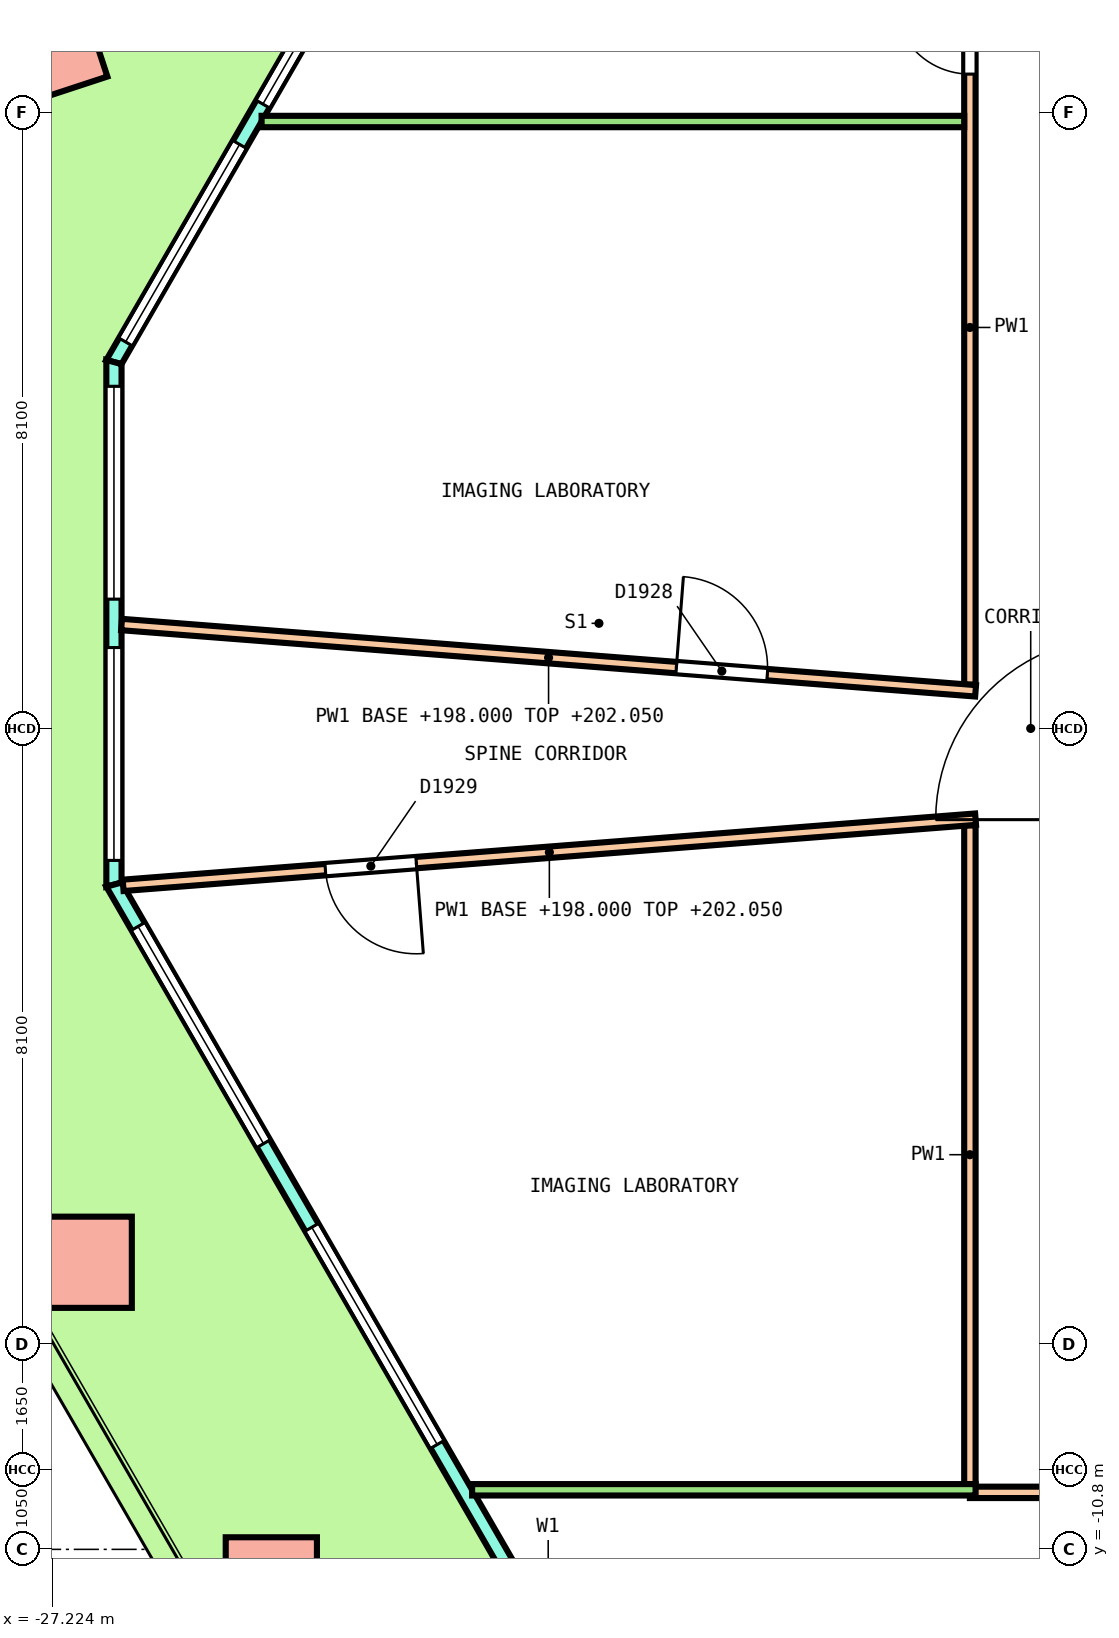
"""IFC4 building model, lengths in metres.
Left out: names, types, materials, properties, quantities, classifications, styles, units other than length and angle.
Written with IfcOpenShell. Run it as: python <this file> out.ifc"""

import sys

from ifc_helpers import new_model, si_unit, direction, frame, frame_2d, origin, origin_2d, place, context, subcontext, project, spatial, polyline, rectangle, outline, extrude, element, fill, save


model = new_model("IFC4")
c1 = context("Model", 3, precision=1e-05, world=origin(), true_north=direction((0.0, 1.0)))
c2 = subcontext(c1, "Body", "Model", "MODEL_VIEW")
j1 = project(units=[si_unit("LENGTHUNIT", "METRE"), si_unit("PLANEANGLEUNIT", "RADIAN")], contexts=[c1])
p1 = place(None, origin())
s1 = spatial("IfcSite", under=j1, at=p1, CompositionType="ELEMENT")
p2 = place(p1, origin())
s2 = spatial("IfcBuilding", under=s1, at=p2, CompositionType="ELEMENT")
p3 = place(p2, frame((0.0, 0.0, 198.0)))
s3 = spatial("IfcBuildingStorey", under=s2, at=p3, CompositionType="ELEMENT", Elevation=198.0)
p4 = place(p3, frame((-27.255, 8.959, 0.0), z_axis=(0.206606302498, -0.238581087409, 0.9488903522), x_axis=(-0.524170547966, -0.845891471379, -0.09855381927)))
e1 = element("IfcColumn", 1, at=p4, inside=s3, PredefinedType="COLUMN", context=c2, shape_type="SweptSolid", body=[
    extrude(rectangle(XDim=1.2, YDim=1.2, at=origin_2d()), origin(), (0.0, 0.0, 1.0), 4.268),
])
p5 = place(p3, frame((-26.776, -7.023, 0.0), z_axis=(0.106402456539, -0.184226228858, 0.977107575369), x_axis=(0.488665296242, -0.846135593228, -0.212745825157)))
e2 = element("IfcColumn", 2, at=p5, inside=s3, PredefinedType="COLUMN", context=c2, shape_type="SweptSolid", body=[
    extrude(rectangle(XDim=1.2, YDim=1.2, at=origin_2d()), origin(), (0.0, 0.0, 1.0), 4.135),
])
p6 = place(p3, frame((-24.341, -11.241, 0.0), z_axis=(0.036163093475, -0.062682695358, 0.997378118054), x_axis=(0.498499920841, -0.86386395882, -0.07236635664)))
e3 = element("IfcColumn", 3, at=p6, inside=s3, PredefinedType="COLUMN", context=c2, shape_type="SweptSolid", body=[
    extrude(rectangle(XDim=1.2, YDim=1.2, at=origin_2d()), origin(), (0.0, 0.0, 1.0), 4.051),
])
p7 = place(p3, frame((-17.38, 20.463, 0.0), z_axis=(0.0, 0.0, 1.0), x_axis=(-0.500000137386, -0.866025324465, 0.0)))
e4 = element("IfcWall", 4, at=p7, inside=s3, PredefinedType="SOLIDWALL", context=c2, shape_type="SweptSolid", body=[
    extrude(outline(polyline([(-0.027, -0.1), (0.979, -0.1), (1.986, -0.1), (2.992, -0.1), (3.999, -0.1), (5.005, -0.1), (6.012, -0.1), (7.018, -0.1), (8.025, -0.1), (9.031, -0.1), (10.038, -0.1), (11.044, -0.1), (12.051, -0.1), (13.057, -0.1), (14.063, -0.1), (15.07, -0.1), (16.076, -0.1), (17.083, -0.1), (18.089, -0.1), (18.036, 0.1), (17.035, 0.1), (16.035, 0.1), (15.034, 0.1), (14.034, 0.1), (13.033, 0.1), (12.033, 0.1), (11.032, 0.1), (10.032, 0.1), (9.031, 0.1), (8.031, 0.1), (7.03, 0.1), (6.03, 0.1), (5.029, 0.1), (4.029, 0.1), (3.028, 0.1), (2.028, 0.1), (1.027, 0.1), (0.027, 0.1), (-0.027, -0.1)])), origin(), (0.0, 0.0, 1.0), 4.1),
])
p8 = place(p7, frame((0.306, 0.0, 0.1)))
e5 = element("IfcOpeningElement", 5, at=p8, cuts=e4, PredefinedType="OPENING", context=c2, shape_type="SweptSolid", body=[
    extrude(rectangle(XDim=3.0, YDim=2.9, at=frame_2d((1.5, 1.45))), frame((0.0, 0.11, 0.0), z_axis=(0.0, -1.0, 0.0), x_axis=(1.0, 0.0, 0.0)), (0.0, 0.0, 1.0), 0.22),
])
p9 = place(p7, frame((3.919, 0.0, 0.1)))
e6 = element("IfcOpeningElement", 6, at=p9, cuts=e4, PredefinedType="OPENING", context=c2, shape_type="SweptSolid", body=[
    extrude(rectangle(XDim=3.0, YDim=2.9, at=frame_2d((1.5, 1.45))), frame((0.0, 0.11, 0.0), z_axis=(0.0, -1.0, 0.0), x_axis=(1.0, 0.0, 0.0)), (0.0, 0.0, 1.0), 0.22),
])
p10 = place(p7, frame((8.131, 0.0, 0.0)))
e7 = element("IfcOpeningElement", 7, at=p10, cuts=e4, PredefinedType="OPENING", context=c2, shape_type="SweptSolid", body=[
    extrude(rectangle(XDim=1.8, YDim=2.4, at=frame_2d((0.9, 1.2))), frame((0.0, 0.11, 0.0), z_axis=(0.0, -1.0, 0.0), x_axis=(1.0, 0.0, 0.0)), (0.0, 0.0, 1.0), 0.22),
])
p11 = place(p7, frame((8.131, 0.0, 2.55)))
e8 = element("IfcOpeningElement", 8, at=p11, cuts=e4, PredefinedType="OPENING", context=c2, shape_type="SweptSolid", body=[
    extrude(rectangle(XDim=1.8, YDim=0.45, at=frame_2d((0.9, 0.225))), frame((0.0, 0.11, 0.0), z_axis=(0.0, -1.0, 0.0), x_axis=(1.0, 0.0, 0.0)), (0.0, 0.0, 1.0), 0.22),
])
p12 = place(p7, frame((11.144, 0.0, 0.1)))
e9 = element("IfcOpeningElement", 9, at=p12, cuts=e4, PredefinedType="OPENING", context=c2, shape_type="SweptSolid", body=[
    extrude(rectangle(XDim=3.0, YDim=2.9, at=frame_2d((1.5, 1.45))), frame((0.0, 0.11, 0.0), z_axis=(0.0, -1.0, 0.0), x_axis=(1.0, 0.0, 0.0)), (0.0, 0.0, 1.0), 0.22),
])
p13 = place(p7, frame((14.756, 0.0, 0.1)))
e10 = element("IfcOpeningElement", 10, at=p13, cuts=e4, PredefinedType="OPENING", context=c2, shape_type="SweptSolid", body=[
    extrude(rectangle(XDim=3.0, YDim=2.9, at=frame_2d((1.5, 1.45))), frame((0.0, 0.11, 0.0), z_axis=(0.0, -1.0, 0.0), x_axis=(1.0, 0.0, 0.0)), (0.0, 0.0, 1.0), 0.22),
])
p14 = place(p3, frame((-26.411, 4.82, 0.0), z_axis=(0.0, 0.0, 1.0), x_axis=(0.0, -1.0, 0.0)))
e11 = element("IfcWall", 11, at=p14, inside=s3, PredefinedType="SOLIDWALL", context=c2, shape_type="SweptSolid", body=[
    extrude(outline(polyline([(-0.027, -0.1), (1.128, -0.1), (2.283, -0.1), (3.438, -0.1), (4.592, -0.1), (5.747, -0.1), (6.902, -0.1), (6.848, 0.1), (5.711, 0.1), (4.574, 0.1), (3.438, 0.1), (2.301, 0.1), (1.164, 0.1), (0.027, 0.1), (-0.027, -0.1)])), origin(), (0.0, 0.0, 1.0), 4.1),
])
p15 = place(p14, frame((0.319, 0.0, 0.1)))
e12 = element("IfcOpeningElement", 12, at=p15, cuts=e11, PredefinedType="OPENING", context=c2, shape_type="SweptSolid", body=[
    extrude(rectangle(XDim=2.8, YDim=2.9, at=frame_2d((1.4, 1.45))), frame((0.0, 0.11, 0.0), z_axis=(0.0, -1.0, 0.0), x_axis=(1.0, 0.0, 0.0)), (0.0, 0.0, 1.0), 0.22),
])
p16 = place(p14, frame((3.756, 0.0, 0.1)))
e13 = element("IfcOpeningElement", 13, at=p16, cuts=e11, PredefinedType="OPENING", context=c2, shape_type="SweptSolid", body=[
    extrude(rectangle(XDim=2.8, YDim=2.9, at=frame_2d((1.4, 1.45))), frame((0.0, 0.11, 0.0), z_axis=(0.0, -1.0, 0.0), x_axis=(1.0, 0.0, 0.0)), (0.0, 0.0, 1.0), 0.22),
])
p17 = place(p3, frame((-26.411, -2.055, 0.0), z_axis=(0.0, 0.0, 1.0), x_axis=(0.50000204422, -0.86602422355, 0.0)))
e14 = element("IfcWall", 14, at=p17, inside=s3, PredefinedType="SOLIDWALL", context=c2, shape_type="SweptSolid", body=[
    extrude(outline(polyline([(-0.027, -0.1), (1.014, -0.1), (2.055, -0.1), (3.097, -0.1), (4.138, -0.1), (5.179, -0.1), (6.22, -0.1), (7.261, -0.1), (8.303, -0.1), (9.344, -0.1), (10.385, -0.1), (11.426, -0.1), (12.468, -0.1), (13.509, -0.1), (14.55, -0.1), (15.591, -0.1), (16.632, -0.1), (17.673, -0.1), (18.715, -0.1), (19.756, -0.1), (20.797, -0.1), (21.838, -0.1), (22.879, -0.1), (22.826, 0.1), (21.789, 0.1), (20.753, 0.1), (19.717, 0.1), (18.68, 0.1), (17.644, 0.1), (16.608, 0.1), (15.572, 0.1), (14.535, 0.1), (13.499, 0.1), (12.463, 0.1), (11.426, 0.1), (10.39, 0.1), (9.354, 0.1), (8.317, 0.1), (7.281, 0.1), (6.245, 0.1), (5.208, 0.1), (4.172, 0.1), (3.136, 0.1), (2.099, 0.1), (1.063, 0.1), (0.027, 0.1), (-0.027, -0.1)])), origin(), (0.0, 0.0, 1.0), 4.1),
])
p18 = place(p17, frame((0.635, 0.0, 0.1)))
e15 = element("IfcOpeningElement", 15, at=p18, cuts=e14, PredefinedType="OPENING", context=c2, shape_type="SweptSolid", body=[
    extrude(rectangle(XDim=3.3, YDim=2.9, at=frame_2d((1.65, 1.45))), frame((0.0, 0.11, 0.0), z_axis=(0.0, -1.0, 0.0), x_axis=(1.0, 0.0, 0.0)), (0.0, 0.0, 1.0), 0.22),
])
p19 = place(p17, frame((5.206, 0.0, 0.1)))
e16 = element("IfcOpeningElement", 16, at=p19, cuts=e14, PredefinedType="OPENING", context=c2, shape_type="SweptSolid", body=[
    extrude(rectangle(XDim=3.3, YDim=2.9, at=frame_2d((1.65, 1.45))), frame((0.0, 0.11, 0.0), z_axis=(0.0, -1.0, 0.0), x_axis=(1.0, 0.0, 0.0)), (0.0, 0.0, 1.0), 0.22),
])
p20 = place(p17, frame((10.526, 0.0, 0.0)))
e17 = element("IfcOpeningElement", 17, at=p20, cuts=e14, PredefinedType="OPENING", context=c2, shape_type="SweptSolid", body=[
    extrude(rectangle(XDim=1.8, YDim=2.4, at=frame_2d((0.9, 1.2))), frame((0.0, 0.11, 0.0), z_axis=(0.0, -1.0, 0.0), x_axis=(1.0, 0.0, 0.0)), (0.0, 0.0, 1.0), 0.22),
])
p21 = place(p17, frame((10.526, 0.0, 2.55)))
e18 = element("IfcOpeningElement", 18, at=p21, cuts=e14, PredefinedType="OPENING", context=c2, shape_type="SweptSolid", body=[
    extrude(rectangle(XDim=1.8, YDim=0.45, at=frame_2d((0.9, 0.225))), frame((0.0, 0.11, 0.0), z_axis=(0.0, -1.0, 0.0), x_axis=(1.0, 0.0, 0.0)), (0.0, 0.0, 1.0), 0.22),
])
p22 = place(p17, frame((14.347, 0.0, 0.1)))
e19 = element("IfcOpeningElement", 19, at=p22, cuts=e14, PredefinedType="OPENING", context=c2, shape_type="SweptSolid", body=[
    extrude(rectangle(XDim=3.3, YDim=2.9, at=frame_2d((1.65, 1.45))), frame((0.0, 0.11, 0.0), z_axis=(0.0, -1.0, 0.0), x_axis=(1.0, 0.0, 0.0)), (0.0, 0.0, 1.0), 0.22),
])
p23 = place(p17, frame((18.917, 0.0, 0.1)))
e20 = element("IfcOpeningElement", 20, at=p23, cuts=e14, PredefinedType="OPENING", context=c2, shape_type="SweptSolid", body=[
    extrude(rectangle(XDim=3.3, YDim=2.9, at=frame_2d((1.65, 1.45))), frame((0.0, 0.11, 0.0), z_axis=(0.0, -1.0, 0.0), x_axis=(1.0, 0.0, 0.0)), (0.0, 0.0, 1.0), 0.22),
])
p24 = place(p3, frame((-15.15, -9.941, 0.0), z_axis=(0.0, 0.0, 1.0), x_axis=(0.0, 1.0, 0.0)))
e21 = element("IfcWall", 21, at=p24, inside=s3, PredefinedType="PARTITIONING", context=c2, shape_type="SweptSolid", body=[
    extrude(rectangle(XDim=8.667, YDim=0.15, at=frame_2d((4.333, 0.0))), origin(), (0.0, 0.0, 1.0), 3.05),
])
p25 = place(p3, frame((-15.15, 0.576, 0.0), z_axis=(0.0, 0.0, 1.0), x_axis=(0.0, 1.0, 0.0)))
e22 = element("IfcWall", 22, at=p25, inside=s3, PredefinedType="PARTITIONING", context=c2, shape_type="SweptSolid", body=[
    extrude(rectangle(XDim=9.399, YDim=0.15, at=frame_2d((4.7, 0.0))), origin(), (0.0, 0.0, 1.0), 3.05),
])
p26 = place(p25, frame((8.033, 0.0, 0.0)))
e23 = element("IfcOpeningElement", 23, at=p26, cuts=e22, PredefinedType="OPENING", context=c2, shape_type="SweptSolid", body=[
    extrude(rectangle(XDim=1.0, YDim=2.1, at=frame_2d((0.5, 1.05))), frame((0.0, 0.085, 0.0), z_axis=(0.0, -1.0, 0.0), x_axis=(1.0, 0.0, 0.0)), (0.0, 0.0, 1.0), 0.17),
])
p27 = place(p3, frame((-15.15, -10.05, 0.0), z_axis=(0.0, 0.0, 1.0), x_axis=(1.0, 0.0, 0.0)))
e24 = element("IfcWall", 24, at=p27, inside=s3, PredefinedType="PARTITIONING", context=c2, shape_type="SweptSolid", body=[
    extrude(rectangle(XDim=30.3, YDim=0.15, at=frame_2d((15.15, 0.0))), origin(), (0.0, 0.0, 1.0), 3.05),
])
p28 = place(p27, frame((1.125, 0.0, 0.0)))
e25 = element("IfcOpeningElement", 25, at=p28, cuts=e24, PredefinedType="OPENING", context=c2, shape_type="SweptSolid", body=[
    extrude(rectangle(XDim=1.2, YDim=2.1, at=frame_2d((0.6, 1.05))), frame((0.0, 0.085, 0.0), z_axis=(0.0, -1.0, 0.0), x_axis=(1.0, 0.0, 0.0)), (0.0, 0.0, 1.0), 0.17),
])
p29 = place(p27, frame((11.222, 0.0, 0.0)))
e26 = element("IfcOpeningElement", 26, at=p29, cuts=e24, PredefinedType="OPENING", context=c2, shape_type="SweptSolid", body=[
    extrude(rectangle(XDim=1.2, YDim=2.1, at=frame_2d((0.6, 1.05))), frame((0.0, 0.085, 0.0), z_axis=(0.0, -1.0, 0.0), x_axis=(1.0, 0.0, 0.0)), (0.0, 0.0, 1.0), 0.17),
])
p30 = place(p27, frame((25.822, 0.0, 0.0)))
e27 = element("IfcOpeningElement", 27, at=p30, cuts=e24, PredefinedType="OPENING", context=c2, shape_type="SweptSolid", body=[
    extrude(rectangle(XDim=1.2, YDim=2.1, at=frame_2d((0.6, 1.05))), frame((0.0, 0.085, 0.0), z_axis=(0.0, -1.0, 0.0), x_axis=(1.0, 0.0, 0.0)), (0.0, 0.0, 1.0), 0.17),
])
p31 = place(p3, frame((-26.311, 1.367, 0.0), z_axis=(0.0, 0.0, 1.0), x_axis=(0.996999820834, -0.077403858151, 0.0)))
e28 = element("IfcWall", 28, at=p31, inside=s3, PredefinedType="PARTITIONING", context=c2, shape_type="SweptSolid", body=[
    extrude(rectangle(XDim=11.27, YDim=0.15, at=frame_2d((5.635, 0.0))), origin(), (0.0, 0.0, 1.0), 4.05),
])
p32 = place(p31, frame((7.321, 0.0, 0.0)))
e29 = element("IfcOpeningElement", 29, at=p32, cuts=e28, PredefinedType="OPENING", context=c2, shape_type="SweptSolid", body=[
    extrude(rectangle(XDim=1.2, YDim=2.1, at=frame_2d((0.6, 1.05))), frame((0.0, 0.085, 0.0), z_axis=(0.0, -1.0, 0.0), x_axis=(1.0, 0.0, 0.0)), (0.0, 0.0, 1.0), 0.17),
])
p33 = place(p3, frame((-26.29, -2.064, 0.0), z_axis=(0.0, 0.0, 1.0), x_axis=(0.997000362213, 0.077396884614, 0.0)))
e30 = element("IfcWall", 30, at=p33, inside=s3, PredefinedType="PARTITIONING", context=c2, shape_type="SweptSolid", body=[
    extrude(rectangle(XDim=11.249, YDim=0.15, at=frame_2d((5.624, 0.0))), origin(), (0.0, 0.0, 1.0), 4.05),
])
p34 = place(p33, frame((2.668, 0.0, 0.0)))
e31 = element("IfcOpeningElement", 31, at=p34, cuts=e30, PredefinedType="OPENING", context=c2, shape_type="SweptSolid", body=[
    extrude(rectangle(XDim=1.2, YDim=2.1, at=frame_2d((0.6, 1.05))), frame((0.0, 0.085, 0.0), z_axis=(0.0, -1.0, 0.0), x_axis=(1.0, 0.0, 0.0)), (0.0, 0.0, 1.0), 0.17),
])
p35 = place(p3, frame((-24.469, 7.985, 0.0), z_axis=(0.0, 0.0, 1.0), x_axis=(1.0, 0.0, 0.0)))
e32 = element("IfcWall", 32, at=p35, inside=s3, PredefinedType="PARTITIONING", context=c2, shape_type="SweptSolid", body=[
    extrude(rectangle(XDim=9.243, YDim=0.15, at=frame_2d((4.622, 0.0))), origin(), (0.0, 0.0, 1.0), 3.05),
])
p36 = place(p3, frame((-21.699, -10.016, 0.0), z_axis=(0.0, 0.0, 1.0), x_axis=(1.0, 0.0, 0.0)))
e33 = element("IfcWall", 33, at=p36, inside=s3, PredefinedType="PARTITIONING", context=c2, shape_type="SweptSolid", body=[
    extrude(rectangle(XDim=6.624, YDim=0.15, at=frame_2d((3.312, 0.0))), origin(), (0.0, 0.0, 1.0), 3.05),
])
p37 = place(p12, origin())
e34 = element("IfcWindow", 34, at=p37, inside=s3, PartitioningType="SINGLE_PANEL", PredefinedType="WINDOW", context=c2, shape_type="SweptSolid", body=[
    extrude(rectangle(XDim=3.0, YDim=2.9, at=frame_2d((1.5, 1.45))), frame((0.0, 0.03, 0.0), z_axis=(0.0, -1.0, 0.0), x_axis=(1.0, 0.0, 0.0)), (0.0, 0.0, 1.0), 0.06),
])
fill(e9, e34)
p38 = place(p13, origin())
e35 = element("IfcWindow", 35, at=p38, inside=s3, PartitioningType="SINGLE_PANEL", PredefinedType="WINDOW", context=c2, shape_type="SweptSolid", body=[
    extrude(rectangle(XDim=3.0, YDim=2.9, at=frame_2d((1.5, 1.45))), frame((0.0, 0.03, 0.0), z_axis=(0.0, -1.0, 0.0), x_axis=(1.0, 0.0, 0.0)), (0.0, 0.0, 1.0), 0.06),
])
fill(e10, e35)
p39 = place(p15, origin())
e36 = element("IfcWindow", 36, at=p39, inside=s3, PartitioningType="SINGLE_PANEL", PredefinedType="WINDOW", context=c2, shape_type="SweptSolid", body=[
    extrude(rectangle(XDim=2.8, YDim=2.9, at=frame_2d((1.4, 1.45))), frame((0.0, 0.03, 0.0), z_axis=(0.0, -1.0, 0.0), x_axis=(1.0, 0.0, 0.0)), (0.0, 0.0, 1.0), 0.06),
])
fill(e12, e36)
p40 = place(p16, origin())
e37 = element("IfcWindow", 37, at=p40, inside=s3, PartitioningType="SINGLE_PANEL", PredefinedType="WINDOW", context=c2, shape_type="SweptSolid", body=[
    extrude(rectangle(XDim=2.8, YDim=2.9, at=frame_2d((1.4, 1.45))), frame((0.0, 0.03, 0.0), z_axis=(0.0, -1.0, 0.0), x_axis=(1.0, 0.0, 0.0)), (0.0, 0.0, 1.0), 0.06),
])
fill(e13, e37)
p41 = place(p18, origin())
e38 = element("IfcWindow", 38, at=p41, inside=s3, PartitioningType="SINGLE_PANEL", PredefinedType="WINDOW", context=c2, shape_type="SweptSolid", body=[
    extrude(rectangle(XDim=3.3, YDim=2.9, at=frame_2d((1.65, 1.45))), frame((0.0, 0.03, 0.0), z_axis=(0.0, -1.0, 0.0), x_axis=(1.0, 0.0, 0.0)), (0.0, 0.0, 1.0), 0.06),
])
fill(e15, e38)
p42 = place(p19, origin())
e39 = element("IfcWindow", 39, at=p42, inside=s3, PartitioningType="SINGLE_PANEL", PredefinedType="WINDOW", context=c2, shape_type="SweptSolid", body=[
    extrude(rectangle(XDim=3.3, YDim=2.9, at=frame_2d((1.65, 1.45))), frame((0.0, 0.03, 0.0), z_axis=(0.0, -1.0, 0.0), x_axis=(1.0, 0.0, 0.0)), (0.0, 0.0, 1.0), 0.06),
])
fill(e16, e39)
p43 = place(p26, origin())
e40 = element("IfcDoor", 40, at=p43, inside=s3, OperationType="SINGLE_SWING_LEFT", PredefinedType="DOOR", context=c2, shape_type="SweptSolid", body=[
    extrude(rectangle(XDim=1.0, YDim=2.1, at=frame_2d((0.5, 1.05))), frame((0.0, 0.025, 0.0), z_axis=(0.0, -1.0, 0.0), x_axis=(1.0, 0.0, 0.0)), (0.0, 0.0, 1.0), 0.05),
])
fill(e23, e40)
p44 = place(p32, origin())
e41 = element("IfcDoor", 41, at=p44, inside=s3, OperationType="DOUBLE_DOOR_SINGLE_SWING", PredefinedType="DOOR", context=c2, shape_type="SweptSolid", body=[
    extrude(rectangle(XDim=1.2, YDim=2.1, at=frame_2d((0.6, 1.05))), frame((0.0, 0.025, 0.0), z_axis=(0.0, -1.0, 0.0), x_axis=(1.0, 0.0, 0.0)), (0.0, 0.0, 1.0), 0.05),
])
fill(e29, e41)
p45 = place(p34, origin())
e42 = element("IfcDoor", 42, at=p45, inside=s3, OperationType="DOUBLE_DOOR_SINGLE_SWING", PredefinedType="DOOR", context=c2, shape_type="SweptSolid", body=[
    extrude(rectangle(XDim=1.2, YDim=2.1, at=frame_2d((0.6, 1.05))), frame((0.0, 0.025, 0.0), z_axis=(0.0, -1.0, 0.0), x_axis=(1.0, 0.0, 0.0)), (0.0, 0.0, 1.0), 0.05),
])
fill(e31, e42)
save(model, sys.argv[1])
